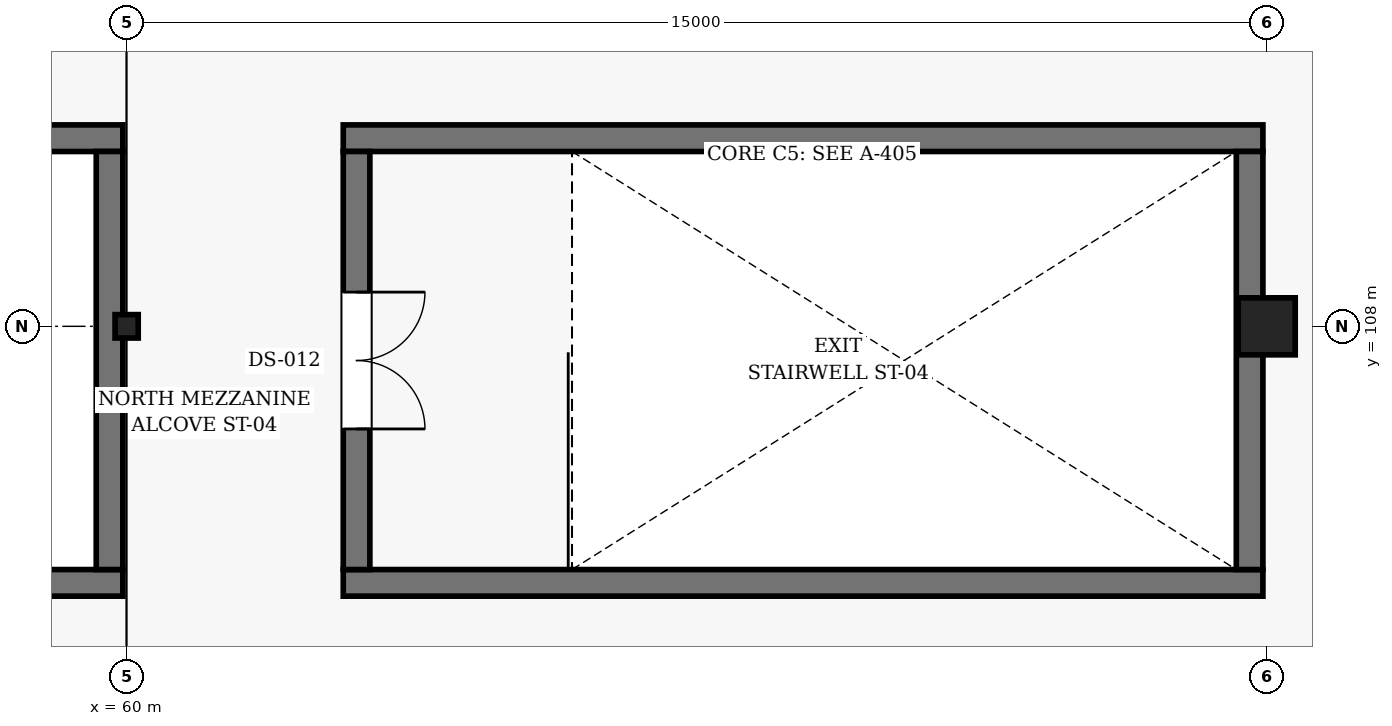
"""IFC4 building model, lengths in metres.
Left out: names, types, materials, properties, quantities, classifications, styles, units other than length and angle.
Written with IfcOpenShell. Run it as: python <this file> out.ifc"""

import sys

from ifc_helpers import new_model, si_unit, direction, frame, frame_2d, origin, origin_2d, place, context, subcontext, project, spatial, rectangle, i_section, extrude, element, fill, save


model = new_model("IFC4")
c1 = context("Model", 3, precision=1e-05, world=origin(), true_north=direction((0.0, 1.0)))
c2 = subcontext(c1, "Body", "Model", "MODEL_VIEW")
j1 = project(units=[si_unit("LENGTHUNIT", "METRE"), si_unit("PLANEANGLEUNIT", "RADIAN")], contexts=[c1])
p1 = place(None, origin())
s1 = spatial("IfcSite", under=j1, at=p1, CompositionType="ELEMENT")
p2 = place(p1, origin())
s2 = spatial("IfcBuilding", under=s1, at=p2, CompositionType="ELEMENT")
p3 = place(p2, frame((0.0, 0.0, 5.4)))
s3 = spatial("IfcBuildingStorey", under=s2, at=p3, CompositionType="ELEMENT", Elevation=5.4)
p4 = place(p3, frame((60.0, 108.0, 0.0), z_axis=(0.0, 0.0, 1.0), x_axis=(1.0, 0.0, 0.0)))
e1 = element("IfcColumn", 1, at=p4, inside=s3, PredefinedType="COLUMN", context=c2, shape_type="SweptSolid", body=[
    extrude(i_section(OverallWidth=0.305, OverallDepth=0.308, WebThickness=0.01, FlangeThickness=0.015, FilletRadius=0.015, at=origin_2d()), origin(), (0.0, 0.0, 1.0), 5.205),
])
p5 = place(p3, frame((75.0, 108.0, 0.0), z_axis=(0.0, 0.0, 1.0), x_axis=(1.0, 0.0, 0.0)))
e2 = element("IfcColumn", 2, at=p5, inside=s3, PredefinedType="COLUMN", context=c2, shape_type="SweptSolid", body=[
    extrude(rectangle(XDim=0.75, YDim=0.75, at=origin_2d()), origin(), (0.0, 0.0, 1.0), 5.205),
])
for number, where, z_axis, x_axis in (
    (3, (47.85, 104.625, 0.0), (0.0, 0.0, 1.0), (1.0, 0.0, 0.0)),
    (4, (59.95, 110.475, 0.0), (0.0, 0.0, 1.0), (-1.0, 0.0, 0.0)),
):
    element("IfcWall", number, at=place(p3, frame(where, z_axis=z_axis, x_axis=x_axis)), inside=s3, PredefinedType="SHEAR", context=c2, shape_type="SweptSolid", body=[
        extrude(rectangle(XDim=12.1, YDim=0.35, at=frame_2d((6.05, 0.0))), origin(), (0.0, 0.0, 1.0), 5.205),
    ])
p6 = place(p3, frame((59.775, 104.8, 0.0), z_axis=(0.0, 0.0, 1.0), x_axis=(0.0, 1.0, 0.0)))
e5 = element("IfcWall", 5, at=p6, inside=s3, PredefinedType="SHEAR", context=c2, shape_type="SweptSolid", body=[
    extrude(rectangle(XDim=5.5, YDim=0.35, at=frame_2d((2.75, 0.0))), origin(), (0.0, 0.0, 1.0), 5.205),
])
for number, where, z_axis, x_axis in (
    (6, (62.85, 104.625, 0.0), (0.0, 0.0, 1.0), (1.0, 0.0, 0.0)),
    (7, (74.95, 110.475, 0.0), (0.0, 0.0, 1.0), (-1.0, 0.0, 0.0)),
):
    element("IfcWall", number, at=place(p3, frame(where, z_axis=z_axis, x_axis=x_axis)), inside=s3, PredefinedType="SHEAR", context=c2, shape_type="SweptSolid", body=[
        extrude(rectangle(XDim=12.1, YDim=0.35, at=frame_2d((6.05, 0.0))), origin(), (0.0, 0.0, 1.0), 5.205),
    ])
p7 = place(p3, frame((63.025, 110.3, 0.0), z_axis=(0.0, 0.0, 1.0), x_axis=(0.0, -1.0, 0.0)))
e8 = element("IfcWall", 8, at=p7, inside=s3, PredefinedType="SHEAR", context=c2, shape_type="SweptSolid", body=[
    extrude(rectangle(XDim=5.5, YDim=0.35, at=frame_2d((2.75, 0.0))), origin(), (0.0, 0.0, 1.0), 5.205),
])
p8 = place(p7, frame((1.85, 0.0, 0.0)))
e9 = element("IfcOpeningElement", 9, at=p8, cuts=e8, PredefinedType="OPENING", context=c2, shape_type="SweptSolid", body=[
    extrude(rectangle(XDim=1.8, YDim=2.2, at=frame_2d((0.9, 1.1))), frame((0.0, 0.185, 0.0), z_axis=(0.0, -1.0, 0.0), x_axis=(1.0, 0.0, 0.0)), (0.0, 0.0, 1.0), 0.37),
])
p9 = place(p3, frame((74.775, 104.8, 0.0), z_axis=(0.0, 0.0, 1.0), x_axis=(0.0, 1.0, 0.0)))
e10 = element("IfcWall", 10, at=p9, inside=s3, PredefinedType="SHEAR", context=c2, shape_type="SweptSolid", body=[
    extrude(rectangle(XDim=5.5, YDim=0.35, at=frame_2d((2.75, 0.0))), origin(), (0.0, 0.0, 1.0), 5.205),
])
p10 = place(p8, origin())
e11 = element("IfcDoor", 11, at=p10, inside=s3, OperationType="DOUBLE_DOOR_SINGLE_SWING", PredefinedType="DOOR", context=c2, shape_type="SweptSolid", body=[
    extrude(rectangle(XDim=1.8, YDim=2.2, at=frame_2d((0.9, 1.1))), frame((0.0, 0.025, 0.0), z_axis=(0.0, -1.0, 0.0), x_axis=(1.0, 0.0, 0.0)), (0.0, 0.0, 1.0), 0.05),
])
fill(e9, e11)
save(model, sys.argv[1])
